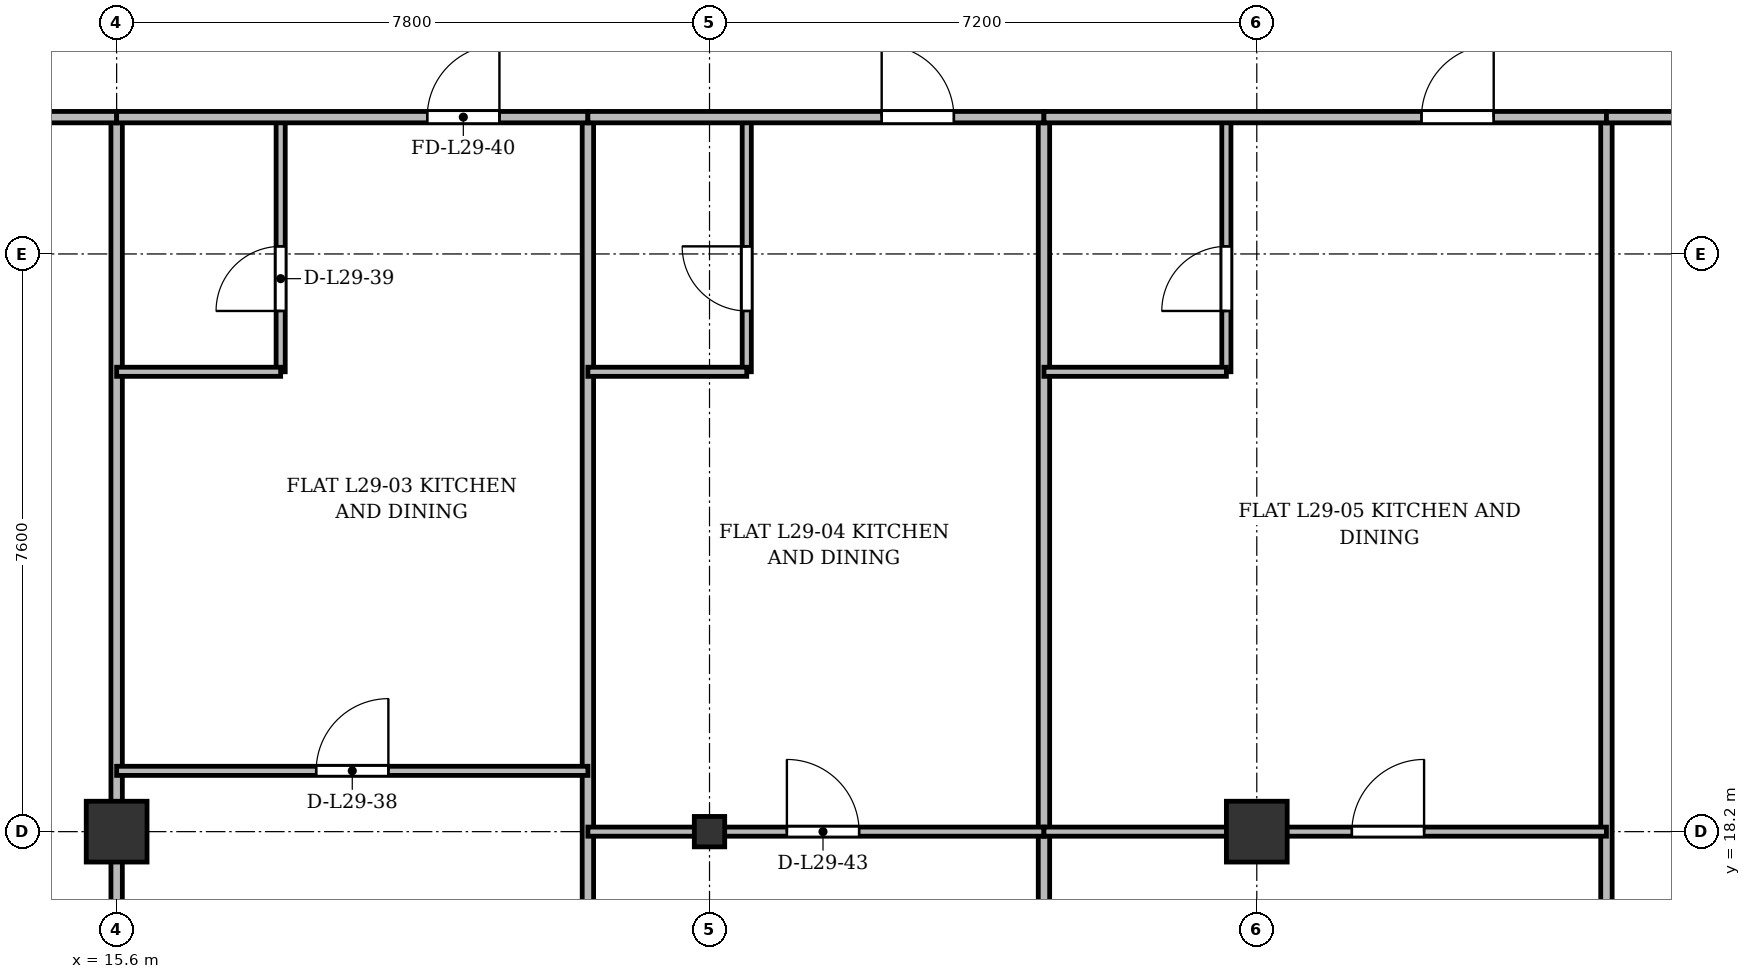
"""IFC4 building model, lengths in metres.
Left out: names, types, materials, properties, quantities, classifications, styles, units other than length and angle.
Written with IfcOpenShell. Run it as: python <this file> out.ifc"""

import sys

from ifc_helpers import new_model, si_unit, direction, frame, frame_2d, origin, origin_2d, place, context, subcontext, project, spatial, rectangle, i_section, extrude, source, transform, mapped, element, fill, save


model = new_model("IFC4")
c1 = context("Model", 3, precision=1e-05, world=origin(), true_north=direction((0.0, 1.0)))
c2 = subcontext(c1, "Body", "Model", "MODEL_VIEW")
j1 = project(units=[si_unit("LENGTHUNIT", "METRE"), si_unit("PLANEANGLEUNIT", "RADIAN")], contexts=[c1])
p1 = place(None, origin())
s1 = spatial("IfcSite", under=j1, at=p1, CompositionType="ELEMENT")
p2 = place(p1, origin())
s2 = spatial("IfcBuilding", under=s1, at=p2, CompositionType="ELEMENT")
p3 = place(p2, frame((0.0, 0.0, 114.1)))
s3 = spatial("IfcBuildingStorey", under=s2, at=p3, CompositionType="ELEMENT", Elevation=114.1)
m1 = source(origin(), c2, "Body", "SweptSolid", [
    extrude(rectangle(XDim=0.8, YDim=0.8, at=origin_2d()), origin(), (0.0, 0.0, 1.0), 3.6),
])
p4 = place(p3, frame((15.6, 18.2, 0.0), z_axis=(0.0, 0.0, 1.0), x_axis=(1.0, 0.0, 0.0)))
e1 = element("IfcColumn", 1, at=p4, inside=s3, PredefinedType="COLUMN", context=c2, shape_type="MappedRepresentation", body=[
    mapped(m1, transform((0.0, 0.0, 0.0), x_axis=(1.0, 0.0, 0.0), y_axis=(0.0, 1.0, 0.0), z_axis=(0.0, 0.0, 1.0), scale=1.0)),
])
m2 = source(origin(), c2, "Body", "SweptSolid", [
    extrude(i_section(OverallWidth=0.4, OverallDepth=0.4, WebThickness=0.022, FlangeThickness=0.035, at=origin_2d()), origin(), (0.0, 0.0, 1.0), 3.6),
])
p5 = place(p3, frame((23.4, 18.2, 0.0), z_axis=(0.0, 0.0, 1.0), x_axis=(1.0, 0.0, 0.0)))
e2 = element("IfcColumn", 2, at=p5, inside=s3, PredefinedType="COLUMN", context=c2, shape_type="MappedRepresentation", body=[
    mapped(m2, transform((0.0, 0.0, 0.0), x_axis=(1.0, 0.0, 0.0), y_axis=(0.0, 1.0, 0.0), z_axis=(0.0, 0.0, 1.0), scale=1.0)),
])
p6 = place(p3, frame((30.6, 18.2, 0.0), z_axis=(0.0, 0.0, 1.0), x_axis=(1.0, 0.0, 0.0)))
e3 = element("IfcColumn", 3, at=p6, inside=s3, PredefinedType="COLUMN", context=c2, shape_type="MappedRepresentation", body=[
    mapped(m1, transform((0.0, 0.0, 0.0), x_axis=(1.0, 0.0, 0.0), y_axis=(0.0, 1.0, 0.0), z_axis=(0.0, 0.0, 1.0), scale=1.0)),
])
p7 = place(p3, frame((15.6, 3.145, 0.0), z_axis=(0.0, 0.0, 1.0), x_axis=(0.0, 1.0, 0.0)))
e4 = element("IfcWall", 4, at=p7, inside=s3, PredefinedType="PARTITIONING", context=c2, shape_type="SweptSolid", body=[
    extrude(rectangle(XDim=24.455, YDim=0.15, at=frame_2d((12.228, 0.0))), origin(), (0.0, 0.0, 1.0), 2.84),
])
for number, where, z_axis, x_axis in (
    (5, (21.8, 3.145, 0.0), (0.0, 0.0, 1.0), (0.0, 1.0, 0.0)),
    (6, (27.8, 3.145, 0.0), (0.0, 0.0, 1.0), (0.0, 1.0, 0.0)),
    (7, (35.2, 3.145, 0.0), (0.0, 0.0, 1.0), (0.0, 1.0, 0.0)),
):
    element("IfcWall", number, at=place(p3, frame(where, z_axis=z_axis, x_axis=x_axis)), inside=s3, PredefinedType="PARTITIONING", context=c2, shape_type="SweptSolid", body=[
        extrude(rectangle(XDim=24.455, YDim=0.15, at=frame_2d((12.228, 0.0))), origin(), (0.0, 0.0, 1.0), 2.752),
    ])
p8 = place(p3, frame((10.2, 27.6, 0.0), z_axis=(0.0, 0.0, 1.0), x_axis=(1.0, 0.0, 0.0)))
e8 = element("IfcWall", 8, at=p8, inside=s3, PredefinedType="PARTITIONING", context=c2, shape_type="SweptSolid", body=[
    extrude(rectangle(XDim=5.4, YDim=0.15, at=frame_2d((2.7, 0.0))), origin(), (0.0, 0.0, 1.0), 2.84),
])
p9 = place(p8, frame((2.225, 0.0, 0.0)))
e9 = element("IfcOpeningElement", 9, at=p9, cuts=e8, PredefinedType="OPENING", context=c2, shape_type="SweptSolid", body=[
    extrude(rectangle(XDim=0.95, YDim=2.15, at=frame_2d((0.475, 1.075))), frame((0.0, 0.085, 0.0), z_axis=(0.0, -1.0, 0.0), x_axis=(1.0, 0.0, 0.0)), (0.0, 0.0, 1.0), 0.17),
])
p10 = place(p3, frame((15.6, 19.0, 0.0), z_axis=(0.0, 0.0, 1.0), x_axis=(1.0, 0.0, 0.0)))
e10 = element("IfcWall", 10, at=p10, inside=s3, PredefinedType="PARTITIONING", context=c2, shape_type="SweptSolid", body=[
    extrude(rectangle(XDim=6.2, YDim=0.12, at=frame_2d((3.1, 0.0))), origin(), (0.0, 0.0, 1.0), 2.84),
])
p11 = place(p10, frame((2.625, 0.0, 0.0)))
e11 = element("IfcOpeningElement", 11, at=p11, cuts=e10, PredefinedType="OPENING", context=c2, shape_type="SweptSolid", body=[
    extrude(rectangle(XDim=0.95, YDim=2.15, at=frame_2d((0.475, 1.075))), frame((0.0, 0.07, 0.0), z_axis=(0.0, -1.0, 0.0), x_axis=(1.0, 0.0, 0.0)), (0.0, 0.0, 1.0), 0.14),
])
p12 = place(p3, frame((17.758, 24.25, 0.0), z_axis=(0.0, 0.0, 1.0), x_axis=(0.0, 1.0, 0.0)))
e12 = element("IfcWall", 12, at=p12, inside=s3, PredefinedType="PARTITIONING", context=c2, shape_type="SweptSolid", body=[
    extrude(rectangle(XDim=3.35, YDim=0.12, at=frame_2d((1.675, 0.0))), origin(), (0.0, 0.0, 1.0), 2.99),
])
p13 = place(p12, frame((0.8, 0.0, 0.0)))
e13 = element("IfcOpeningElement", 13, at=p13, cuts=e12, PredefinedType="OPENING", context=c2, shape_type="SweptSolid", body=[
    extrude(rectangle(XDim=0.85, YDim=2.1, at=frame_2d((0.425, 1.05))), frame((0.0, 0.07, 0.0), z_axis=(0.0, -1.0, 0.0), x_axis=(1.0, 0.0, 0.0)), (0.0, 0.0, 1.0), 0.14),
])
p14 = place(p3, frame((15.6, 24.25, 0.0), z_axis=(0.0, 0.0, 1.0), x_axis=(1.0, 0.0, 0.0)))
e14 = element("IfcWall", 14, at=p14, inside=s3, PredefinedType="PARTITIONING", context=c2, shape_type="SweptSolid", body=[
    extrude(rectangle(XDim=2.158, YDim=0.12, at=frame_2d((1.079, 0.0))), origin(), (0.0, 0.0, 1.0), 2.84),
])
p15 = place(p3, frame((15.6, 27.6, 0.0), z_axis=(0.0, 0.0, 1.0), x_axis=(1.0, 0.0, 0.0)))
e15 = element("IfcWall", 15, at=p15, inside=s3, PredefinedType="PARTITIONING", context=c2, shape_type="SweptSolid", body=[
    extrude(rectangle(XDim=6.2, YDim=0.15, at=frame_2d((3.1, 0.0))), origin(), (0.0, 0.0, 1.0), 2.84),
])
p16 = place(p15, frame((4.086, 0.0, 0.0)))
e16 = element("IfcOpeningElement", 16, at=p16, cuts=e15, PredefinedType="OPENING", context=c2, shape_type="SweptSolid", body=[
    extrude(rectangle(XDim=0.95, YDim=2.15, at=frame_2d((0.475, 1.075))), frame((0.0, 0.085, 0.0), z_axis=(0.0, -1.0, 0.0), x_axis=(1.0, 0.0, 0.0)), (0.0, 0.0, 1.0), 0.17),
])
p17 = place(p3, frame((21.8, 18.2, 0.0), z_axis=(0.0, 0.0, 1.0), x_axis=(1.0, 0.0, 0.0)))
e17 = element("IfcWall", 17, at=p17, inside=s3, PredefinedType="PARTITIONING", context=c2, shape_type="SweptSolid", body=[
    extrude(rectangle(XDim=6.0, YDim=0.12, at=frame_2d((3.0, 0.0))), origin(), (0.0, 0.0, 1.0), 2.752),
])
p18 = place(p17, frame((2.618, 0.0, 0.0)))
e18 = element("IfcOpeningElement", 18, at=p18, cuts=e17, PredefinedType="OPENING", context=c2, shape_type="SweptSolid", body=[
    extrude(rectangle(XDim=0.95, YDim=2.15, at=frame_2d((0.475, 1.075))), frame((0.0, 0.07, 0.0), z_axis=(0.0, -1.0, 0.0), x_axis=(1.0, 0.0, 0.0)), (0.0, 0.0, 1.0), 0.14),
])
p19 = place(p3, frame((23.89, 24.25, 0.0), z_axis=(0.0, 0.0, 1.0), x_axis=(0.0, 1.0, 0.0)))
e19 = element("IfcWall", 19, at=p19, inside=s3, PredefinedType="PARTITIONING", context=c2, shape_type="SweptSolid", body=[
    extrude(rectangle(XDim=3.35, YDim=0.12, at=frame_2d((1.675, 0.0))), origin(), (0.0, 0.0, 1.0), 2.99),
])
p20 = place(p19, frame((0.8, 0.0, 0.0)))
e20 = element("IfcOpeningElement", 20, at=p20, cuts=e19, PredefinedType="OPENING", context=c2, shape_type="SweptSolid", body=[
    extrude(rectangle(XDim=0.85, YDim=2.1, at=frame_2d((0.425, 1.05))), frame((0.0, 0.07, 0.0), z_axis=(0.0, -1.0, 0.0), x_axis=(1.0, 0.0, 0.0)), (0.0, 0.0, 1.0), 0.14),
])
p21 = place(p3, frame((21.8, 24.25, 0.0), z_axis=(0.0, 0.0, 1.0), x_axis=(1.0, 0.0, 0.0)))
e21 = element("IfcWall", 21, at=p21, inside=s3, PredefinedType="PARTITIONING", context=c2, shape_type="SweptSolid", body=[
    extrude(rectangle(XDim=2.09, YDim=0.12, at=frame_2d((1.045, 0.0))), origin(), (0.0, 0.0, 1.0), 2.84),
])
p22 = place(p3, frame((21.8, 27.6, 0.0), z_axis=(0.0, 0.0, 1.0), x_axis=(1.0, 0.0, 0.0)))
e22 = element("IfcWall", 22, at=p22, inside=s3, PredefinedType="PARTITIONING", context=c2, shape_type="SweptSolid", body=[
    extrude(rectangle(XDim=6.0, YDim=0.15, at=frame_2d((3.0, 0.0))), origin(), (0.0, 0.0, 1.0), 2.84),
])
p23 = place(p22, frame((3.865, 0.0, 0.0)))
e23 = element("IfcOpeningElement", 23, at=p23, cuts=e22, PredefinedType="OPENING", context=c2, shape_type="SweptSolid", body=[
    extrude(rectangle(XDim=0.95, YDim=2.15, at=frame_2d((0.475, 1.075))), frame((0.0, 0.085, 0.0), z_axis=(0.0, -1.0, 0.0), x_axis=(1.0, 0.0, 0.0)), (0.0, 0.0, 1.0), 0.17),
])
p24 = place(p3, frame((27.8, 18.2, 0.0), z_axis=(0.0, 0.0, 1.0), x_axis=(1.0, 0.0, 0.0)))
e24 = element("IfcWall", 24, at=p24, inside=s3, PredefinedType="PARTITIONING", context=c2, shape_type="SweptSolid", body=[
    extrude(rectangle(XDim=7.4, YDim=0.12, at=frame_2d((3.7, 0.0))), origin(), (0.0, 0.0, 1.0), 2.752),
])
p25 = place(p24, frame((4.051, 0.0, 0.0)))
e25 = element("IfcOpeningElement", 25, at=p25, cuts=e24, PredefinedType="OPENING", context=c2, shape_type="SweptSolid", body=[
    extrude(rectangle(XDim=0.95, YDim=2.15, at=frame_2d((0.475, 1.075))), frame((0.0, 0.07, 0.0), z_axis=(0.0, -1.0, 0.0), x_axis=(1.0, 0.0, 0.0)), (0.0, 0.0, 1.0), 0.14),
])
p26 = place(p3, frame((30.2, 24.25, 0.0), z_axis=(0.0, 0.0, 1.0), x_axis=(0.0, 1.0, 0.0)))
e26 = element("IfcWall", 26, at=p26, inside=s3, PredefinedType="PARTITIONING", context=c2, shape_type="SweptSolid", body=[
    extrude(rectangle(XDim=3.35, YDim=0.12, at=frame_2d((1.675, 0.0))), origin(), (0.0, 0.0, 1.0), 2.99),
])
p27 = place(p26, frame((0.8, 0.0, 0.0)))
e27 = element("IfcOpeningElement", 27, at=p27, cuts=e26, PredefinedType="OPENING", context=c2, shape_type="SweptSolid", body=[
    extrude(rectangle(XDim=0.85, YDim=2.1, at=frame_2d((0.425, 1.05))), frame((0.0, 0.07, 0.0), z_axis=(0.0, -1.0, 0.0), x_axis=(1.0, 0.0, 0.0)), (0.0, 0.0, 1.0), 0.14),
])
p28 = place(p3, frame((27.8, 24.25, 0.0), z_axis=(0.0, 0.0, 1.0), x_axis=(1.0, 0.0, 0.0)))
e28 = element("IfcWall", 28, at=p28, inside=s3, PredefinedType="PARTITIONING", context=c2, shape_type="SweptSolid", body=[
    extrude(rectangle(XDim=2.4, YDim=0.12, at=frame_2d((1.2, 0.0))), origin(), (0.0, 0.0, 1.0), 3.34),
])
p29 = place(p3, frame((27.8, 27.6, 0.0), z_axis=(0.0, 0.0, 1.0), x_axis=(1.0, 0.0, 0.0)))
e29 = element("IfcWall", 29, at=p29, inside=s3, PredefinedType="PARTITIONING", context=c2, shape_type="SweptSolid", body=[
    extrude(rectangle(XDim=7.4, YDim=0.15, at=frame_2d((3.7, 0.0))), origin(), (0.0, 0.0, 1.0), 2.84),
])
p30 = place(p29, frame((4.967, 0.0, 0.0)))
e30 = element("IfcOpeningElement", 30, at=p30, cuts=e29, PredefinedType="OPENING", context=c2, shape_type="SweptSolid", body=[
    extrude(rectangle(XDim=0.95, YDim=2.15, at=frame_2d((0.475, 1.075))), frame((0.0, 0.085, 0.0), z_axis=(0.0, -1.0, 0.0), x_axis=(1.0, 0.0, 0.0)), (0.0, 0.0, 1.0), 0.17),
])
p31 = place(p3, frame((35.2, 27.6, 0.0), z_axis=(0.0, 0.0, 1.0), x_axis=(1.0, 0.0, 0.0)))
e31 = element("IfcWall", 31, at=p31, inside=s3, PredefinedType="PARTITIONING", context=c2, shape_type="SweptSolid", body=[
    extrude(rectangle(XDim=8.6, YDim=0.15, at=frame_2d((4.3, 0.0))), origin(), (0.0, 0.0, 1.0), 2.84),
])
p32 = place(p31, frame((3.825, 0.0, 0.0)))
e32 = element("IfcOpeningElement", 32, at=p32, cuts=e31, PredefinedType="OPENING", context=c2, shape_type="SweptSolid", body=[
    extrude(rectangle(XDim=0.95, YDim=2.15, at=frame_2d((0.475, 1.075))), frame((0.0, 0.085, 0.0), z_axis=(0.0, -1.0, 0.0), x_axis=(1.0, 0.0, 0.0)), (0.0, 0.0, 1.0), 0.17),
])
m3 = source(origin(), c2, "Body", "SweptSolid", [
    extrude(rectangle(XDim=0.95, YDim=2.15, at=frame_2d((0.475, 1.075))), frame((0.0, 0.025, 0.0), z_axis=(0.0, -1.0, 0.0), x_axis=(1.0, 0.0, 0.0)), (0.0, 0.0, 1.0), 0.05),
])
p33 = place(p11, origin())
e33 = element("IfcDoor", 33, at=p33, inside=s3, OperationType="SINGLE_SWING_RIGHT", PredefinedType="DOOR", context=c2, shape_type="MappedRepresentation", body=[
    mapped(m3, transform((0.0, 0.0, 0.0), x_axis=(1.0, 0.0, 0.0), y_axis=(0.0, 1.0, 0.0), z_axis=(0.0, 0.0, 1.0), scale=1.0)),
])
fill(e11, e33)
m4 = source(origin(), c2, "Body", "SweptSolid", [
    extrude(rectangle(XDim=0.85, YDim=2.1, at=frame_2d((0.425, 1.05))), frame((0.0, 0.025, 0.0), z_axis=(0.0, -1.0, 0.0), x_axis=(1.0, 0.0, 0.0)), (0.0, 0.0, 1.0), 0.05),
])
p34 = place(p13, origin())
e34 = element("IfcDoor", 34, at=p34, inside=s3, OperationType="SINGLE_SWING_LEFT", PredefinedType="DOOR", context=c2, shape_type="MappedRepresentation", body=[
    mapped(m4, transform((0.0, 0.0, 0.0), x_axis=(1.0, 0.0, 0.0), y_axis=(0.0, 1.0, 0.0), z_axis=(0.0, 0.0, 1.0), scale=1.0)),
])
fill(e13, e34)
p35 = place(p16, origin())
e35 = element("IfcDoor", 35, at=p35, inside=s3, OperationType="SINGLE_SWING_RIGHT", PredefinedType="DOOR", context=c2, shape_type="MappedRepresentation", body=[
    mapped(m3, transform((0.0, 0.0, 0.0), x_axis=(1.0, 0.0, 0.0), y_axis=(0.0, 1.0, 0.0), z_axis=(0.0, 0.0, 1.0), scale=1.0)),
])
fill(e16, e35)
p36 = place(p18, origin())
e36 = element("IfcDoor", 36, at=p36, inside=s3, OperationType="SINGLE_SWING_LEFT", PredefinedType="DOOR", context=c2, shape_type="MappedRepresentation", body=[
    mapped(m3, transform((0.0, 0.0, 0.0), x_axis=(1.0, 0.0, 0.0), y_axis=(0.0, 1.0, 0.0), z_axis=(0.0, 0.0, 1.0), scale=1.0)),
])
fill(e18, e36)
p37 = place(p20, origin())
e37 = element("IfcDoor", 37, at=p37, inside=s3, OperationType="SINGLE_SWING_RIGHT", PredefinedType="DOOR", context=c2, shape_type="MappedRepresentation", body=[
    mapped(m4, transform((0.0, 0.0, 0.0), x_axis=(1.0, 0.0, 0.0), y_axis=(0.0, 1.0, 0.0), z_axis=(0.0, 0.0, 1.0), scale=1.0)),
])
fill(e20, e37)
p38 = place(p23, origin())
e38 = element("IfcDoor", 38, at=p38, inside=s3, OperationType="SINGLE_SWING_LEFT", PredefinedType="DOOR", context=c2, shape_type="MappedRepresentation", body=[
    mapped(m3, transform((0.0, 0.0, 0.0), x_axis=(1.0, 0.0, 0.0), y_axis=(0.0, 1.0, 0.0), z_axis=(0.0, 0.0, 1.0), scale=1.0)),
])
fill(e23, e38)
p39 = place(p25, origin())
e39 = element("IfcDoor", 39, at=p39, inside=s3, OperationType="SINGLE_SWING_RIGHT", PredefinedType="DOOR", context=c2, shape_type="MappedRepresentation", body=[
    mapped(m3, transform((0.0, 0.0, 0.0), x_axis=(1.0, 0.0, 0.0), y_axis=(0.0, 1.0, 0.0), z_axis=(0.0, 0.0, 1.0), scale=1.0)),
])
fill(e25, e39)
p40 = place(p27, origin())
e40 = element("IfcDoor", 40, at=p40, inside=s3, OperationType="SINGLE_SWING_LEFT", PredefinedType="DOOR", context=c2, shape_type="MappedRepresentation", body=[
    mapped(m4, transform((0.0, 0.0, 0.0), x_axis=(1.0, 0.0, 0.0), y_axis=(0.0, 1.0, 0.0), z_axis=(0.0, 0.0, 1.0), scale=1.0)),
])
fill(e27, e40)
p41 = place(p30, origin())
e41 = element("IfcDoor", 41, at=p41, inside=s3, OperationType="SINGLE_SWING_RIGHT", PredefinedType="DOOR", context=c2, shape_type="MappedRepresentation", body=[
    mapped(m3, transform((0.0, 0.0, 0.0), x_axis=(1.0, 0.0, 0.0), y_axis=(0.0, 1.0, 0.0), z_axis=(0.0, 0.0, 1.0), scale=1.0)),
])
fill(e30, e41)
save(model, sys.argv[1])
